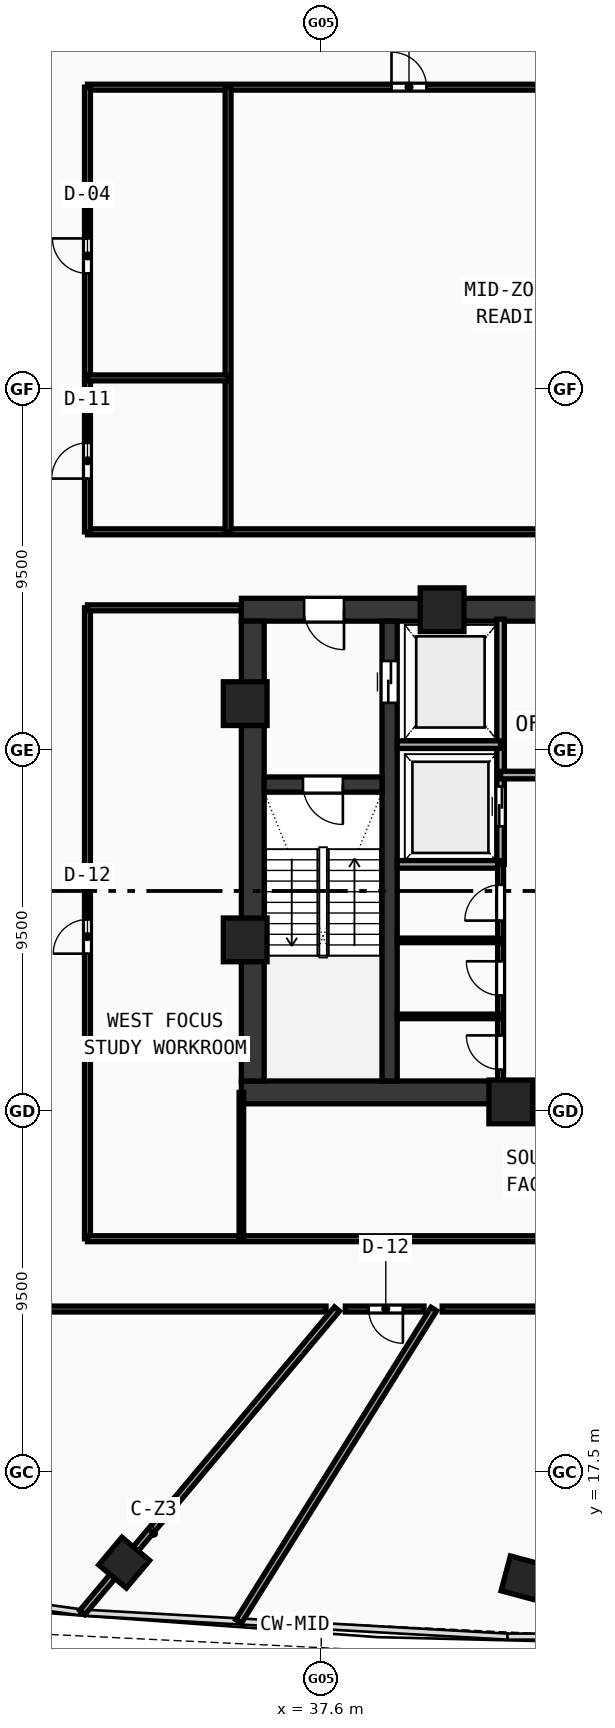
"""IFC4 building model, lengths in metres.
Left out: names, types, materials, properties, quantities, classifications, styles, units other than length and angle.
Written with IfcOpenShell. Run it as: python <this file> out.ifc"""

import sys

from ifc_helpers import new_model, si_unit, direction, frame, frame_2d, origin, origin_with_axes, origin_2d, place, context, subcontext, project, spatial, rectangle, hollow_rectangle, extrude, source, transform, mapped, element, fill, save


model = new_model("IFC4")
c1 = context("Model", 3, precision=1e-05, world=origin(), true_north=direction((0.0, 1.0)))
c2 = subcontext(c1, "Body", "Model", "MODEL_VIEW")
j1 = project(units=[si_unit("LENGTHUNIT", "METRE"), si_unit("PLANEANGLEUNIT", "RADIAN")], contexts=[c1])
p1 = place(None, origin())
s1 = spatial("IfcSite", under=j1, at=p1, CompositionType="ELEMENT")
p2 = place(p1, origin())
s2 = spatial("IfcBuilding", under=s1, at=p2, CompositionType="ELEMENT")
p3 = place(p2, frame((0.0, 0.0, 144.55)))
s3 = spatial("IfcBuildingStorey", under=s2, at=p3, CompositionType="ELEMENT", Elevation=144.55)
p4 = place(p3, frame((35.5, 27.5, 0.0), z_axis=(0.0, 0.0, 1.0), x_axis=(1.0, 0.0, 0.0)))
e1 = element("IfcWall", 1, at=p4, inside=s3, PredefinedType="SHEAR", context=c2, shape_type="SweptSolid", body=[
    extrude(rectangle(XDim=25.0, YDim=0.6, at=frame_2d((12.5, 0.0))), origin(), (0.0, 0.0, 1.0), 3.42),
])
p5 = place(p3, frame((35.5, 40.2, 0.0), z_axis=(0.0, 0.0, 1.0), x_axis=(1.0, 0.0, 0.0)))
e2 = element("IfcWall", 2, at=p5, inside=s3, PredefinedType="SHEAR", context=c2, shape_type="SweptSolid", body=[
    extrude(rectangle(XDim=11.3, YDim=0.6, at=frame_2d((5.65, 0.0))), origin(), (0.0, 0.0, 1.0), 3.42),
])
p6 = place(p5, frame((1.65, 0.0, 0.0)))
e3 = element("IfcOpeningElement", 3, at=p6, cuts=e2, PredefinedType="OPENING", context=c2, shape_type="SweptSolid", body=[
    extrude(rectangle(XDim=1.05, YDim=2.1, at=frame_2d((0.525, 1.05))), frame((0.0, 0.31, 0.0), z_axis=(0.0, -1.0, 0.0), x_axis=(1.0, 0.0, 0.0)), (0.0, 0.0, 1.0), 0.62),
])
p7 = place(p3, frame((35.8, 27.8, 0.0), z_axis=(0.0, 0.0, 1.0), x_axis=(0.0, 1.0, 0.0)))
e4 = element("IfcWall", 4, at=p7, inside=s3, PredefinedType="SHEAR", context=c2, shape_type="SweptSolid", body=[
    extrude(rectangle(XDim=12.1, YDim=0.6, at=frame_2d((6.05, 0.0))), origin(), (0.0, 0.0, 1.0), 3.42),
])
p8 = place(p3, frame((39.4, 27.8, 0.0), z_axis=(0.0, 0.0, 1.0), x_axis=(0.0, 1.0, 0.0)))
e5 = element("IfcWall", 5, at=p8, inside=s3, PredefinedType="SHEAR", context=c2, shape_type="SweptSolid", body=[
    extrude(rectangle(XDim=12.1, YDim=0.4, at=frame_2d((6.05, 0.0))), origin(), (0.0, 0.0, 1.0), 3.42),
])
p9 = place(p8, frame((9.95, 0.0, 0.0)))
e6 = element("IfcOpeningElement", 6, at=p9, cuts=e5, PredefinedType="OPENING", context=c2, shape_type="SweptSolid", body=[
    extrude(rectangle(XDim=1.1, YDim=2.1, at=frame_2d((0.55, 1.05))), frame((0.0, 0.21, 0.0), z_axis=(0.0, -1.0, 0.0), x_axis=(1.0, 0.0, 0.0)), (0.0, 0.0, 1.0), 0.42),
])
p10 = place(p3, frame((36.1, 35.6, 0.0), z_axis=(0.0, 0.0, 1.0), x_axis=(1.0, 0.0, 0.0)))
e7 = element("IfcWall", 7, at=p10, inside=s3, PredefinedType="SHEAR", context=c2, shape_type="SweptSolid", body=[
    extrude(rectangle(XDim=3.1, YDim=0.4, at=frame_2d((1.55, 0.0))), origin(), (0.0, 0.0, 1.0), 3.42),
])
p11 = place(p10, frame((1.02, 0.0, 0.0)))
e8 = element("IfcOpeningElement", 8, at=p11, cuts=e7, PredefinedType="OPENING", context=c2, shape_type="SweptSolid", body=[
    extrude(rectangle(XDim=1.05, YDim=2.1, at=frame_2d((0.525, 1.05))), frame((0.0, 0.21, 0.0), z_axis=(0.0, -1.0, 0.0), x_axis=(1.0, 0.0, 0.0)), (0.0, 0.0, 1.0), 0.42),
])
m1 = source(origin(), c2, "Body", "SweptSolid", [
    extrude(hollow_rectangle(XDim=1.15, YDim=1.15, WallThickness=0.048, at=origin_2d()), origin(), (0.0, 0.0, 1.0), 3.68),
])
for number, where, z_axis, x_axis in (
    (9, (42.588, 27.25, -0.26), (0.0, 0.0, 1.0), (1.0, 0.0, 0.0)),
    (10, (40.781, 40.2, -0.26), (0.0, 0.0, 1.0), (1.0, 0.0, 0.0)),
    (11, (35.6, 37.729, -0.26), (0.0, 0.0, 1.0), (1.0, 0.0, 0.0)),
    (12, (35.6, 31.513, -0.26), (0.0, 0.0, 1.0), (1.0, 0.0, 0.0)),
):
    element("IfcColumn", number, at=place(p3, frame(where, z_axis=z_axis, x_axis=x_axis)), inside=s3, PredefinedType="COLUMN", context=c2, shape_type="MappedRepresentation", body=[
        mapped(m1, transform((0.0, 0.0, 0.0), scale=1.0)),
    ])
m2 = source(origin(), c2, "Body", "SweptSolid", [
    extrude(hollow_rectangle(XDim=0.95, YDim=0.95, WallThickness=0.04, at=origin_2d()), origin(), (0.0, 0.0, 1.0), 3.68),
])
for number, where, z_axis, x_axis in (
    (13, (32.415, 15.126, -0.26), (0.0, 0.0, 1.0), (0.766, -0.643, 0.0)),
    (14, (42.915, 14.722, -0.26), (0.0, 0.0, 1.0), (0.966, -0.259, 0.0)),
):
    element("IfcColumn", number, at=place(p3, frame(where, z_axis=z_axis, x_axis=x_axis)), inside=s3, PredefinedType="COLUMN", context=c2, shape_type="MappedRepresentation", body=[
        mapped(m2, transform((0.0, 0.0, 0.0), scale=1.0)),
    ])
p12 = place(p3, frame((42.32, 33.5, 0.0), z_axis=(0.0, 0.0, 1.0), x_axis=(0.0, 1.0, 0.0)))
e15 = element("IfcWall", 15, at=p12, inside=s3, PredefinedType="SOLIDWALL", context=c2, shape_type="SweptSolid", body=[
    extrude(rectangle(XDim=6.45, YDim=0.2, at=frame_2d((3.225, 0.0))), origin(), (0.0, 0.0, 1.0), 3.42),
])
p13 = place(p12, frame((1.0, 0.0, 0.0)))
e16 = element("IfcOpeningElement", 16, at=p13, cuts=e15, PredefinedType="OPENING", context=c2, shape_type="SweptSolid", body=[
    extrude(rectangle(XDim=1.05, YDim=2.1, at=frame_2d((0.525, 1.05))), frame((0.0, 0.11, 0.0), z_axis=(0.0, -1.0, 0.0), x_axis=(1.0, 0.0, 0.0)), (0.0, 0.0, 1.0), 0.22),
])
for number, where, z_axis, x_axis in (
    (17, (39.6, 36.65, 0.0), (0.0, 0.0, 1.0), (1.0, 0.0, 0.0)),
    (18, (39.6, 33.5, 0.0), (0.0, 0.0, 1.0), (1.0, 0.0, 0.0)),
):
    element("IfcWall", number, at=place(p3, frame(where, z_axis=z_axis, x_axis=x_axis)), inside=s3, PredefinedType="SOLIDWALL", context=c2, shape_type="SweptSolid", body=[
        extrude(rectangle(XDim=2.72, YDim=0.2, at=frame_2d((1.36, 0.0))), origin(), (0.0, 0.0, 1.0), 3.42),
    ])
p14 = place(p3, frame((42.32, 35.85, 0.0), z_axis=(0.0, 0.0, 1.0), x_axis=(1.0, 0.0, 0.0)))
e19 = element("IfcWall", 19, at=p14, inside=s3, PredefinedType="SOLIDWALL", context=c2, shape_type="SweptSolid", body=[
    extrude(rectangle(XDim=4.73, YDim=0.2, at=frame_2d((2.365, 0.0))), origin(), (0.0, 0.0, 1.0), 3.42),
])
p15 = place(p14, frame((1.8, 0.0, 0.0)))
e20 = element("IfcOpeningElement", 20, at=p15, cuts=e19, PredefinedType="OPENING", context=c2, shape_type="SweptSolid", body=[
    extrude(rectangle(XDim=0.9, YDim=2.1, at=frame_2d((0.45, 1.05))), frame((0.0, 0.11, 0.0), z_axis=(0.0, -1.0, 0.0), x_axis=(1.0, 0.0, 0.0)), (0.0, 0.0, 1.0), 0.22),
])
p16 = place(p3, frame((42.32, 27.6, 0.0), z_axis=(0.0, 0.0, 1.0), x_axis=(0.0, 1.0, 0.0)))
e21 = element("IfcWall", 21, at=p16, inside=s3, PredefinedType="PARTITIONING", context=c2, shape_type="SweptSolid", body=[
    extrude(rectangle(XDim=5.9, YDim=0.155, at=frame_2d((2.95, 0.0))), origin(), (0.0, 0.0, 1.0), 3.42),
])
p17 = place(p16, frame((0.5, 0.0, 0.0)))
e22 = element("IfcOpeningElement", 22, at=p17, cuts=e21, PredefinedType="OPENING", context=c2, shape_type="SweptSolid", body=[
    extrude(rectangle(XDim=0.9, YDim=2.1, at=frame_2d((0.45, 1.05))), frame((0.0, 0.087, 0.0), z_axis=(0.0, -1.0, 0.0), x_axis=(1.0, 0.0, 0.0)), (0.0, 0.0, 1.0), 0.175),
])
p18 = place(p16, frame((2.45, 0.0, 0.0)))
e23 = element("IfcOpeningElement", 23, at=p18, cuts=e21, PredefinedType="OPENING", context=c2, shape_type="SweptSolid", body=[
    extrude(rectangle(XDim=0.9, YDim=2.1, at=frame_2d((0.45, 1.05))), frame((0.0, 0.087, 0.0), z_axis=(0.0, -1.0, 0.0), x_axis=(1.0, 0.0, 0.0)), (0.0, 0.0, 1.0), 0.175),
])
p19 = place(p16, frame((4.42, 0.0, 0.0)))
e24 = element("IfcOpeningElement", 24, at=p19, cuts=e21, PredefinedType="OPENING", context=c2, shape_type="SweptSolid", body=[
    extrude(rectangle(XDim=0.94, YDim=2.1, at=frame_2d((0.47, 1.05))), frame((0.0, 0.087, 0.0), z_axis=(0.0, -1.0, 0.0), x_axis=(1.0, 0.0, 0.0)), (0.0, 0.0, 1.0), 0.175),
])
for number, where, z_axis, x_axis in (
    (25, (39.6, 29.5, 0.0), (0.0, 0.0, 1.0), (1.0, 0.0, 0.0)),
    (26, (39.6, 31.5, 0.0), (0.0, 0.0, 1.0), (1.0, 0.0, 0.0)),
):
    element("IfcWall", number, at=place(p3, frame(where, z_axis=z_axis, x_axis=x_axis)), inside=s3, PredefinedType="PARTITIONING", context=c2, shape_type="SweptSolid", body=[
        extrude(rectangle(XDim=2.72, YDim=0.12, at=frame_2d((1.36, 0.0))), origin(), (0.0, 0.0, 1.0), 3.42),
    ])
p20 = place(p3, frame((31.45, 42.25, 0.0), z_axis=(0.0, 0.0, 1.0), x_axis=(1.0, 0.0, 0.0)))
e27 = element("IfcWall", 27, at=p20, inside=s3, PredefinedType="PARTITIONING", context=c2, shape_type="SweptSolid", body=[
    extrude(rectangle(XDim=33.1, YDim=0.155, at=frame_2d((16.55, 0.0))), origin(), (0.0, 0.0, 1.0), 2.77),
])
p21 = place(p3, frame((31.45, 53.95, 0.0), z_axis=(0.0, 0.0, 1.0), x_axis=(1.0, 0.0, 0.0)))
e28 = element("IfcWall", 28, at=p21, inside=s3, PredefinedType="PARTITIONING", context=c2, shape_type="SweptSolid", body=[
    extrude(rectangle(XDim=33.1, YDim=0.155, at=frame_2d((16.55, 0.0))), origin(), (0.0, 0.0, 1.0), 2.77),
])
p22 = place(p21, frame((8.0, 0.0, 0.0)))
e29 = element("IfcOpeningElement", 29, at=p22, cuts=e28, PredefinedType="OPENING", context=c2, shape_type="SweptSolid", body=[
    extrude(rectangle(XDim=0.92, YDim=2.1, at=frame_2d((0.46, 1.05))), frame((0.0, 0.087, 0.0), z_axis=(0.0, -1.0, 0.0), x_axis=(1.0, 0.0, 0.0)), (0.0, 0.0, 1.0), 0.175),
])
p23 = place(p21, frame((25.05, 0.0, 0.0)))
e30 = element("IfcOpeningElement", 30, at=p23, cuts=e28, PredefinedType="OPENING", context=c2, shape_type="SweptSolid", body=[
    extrude(rectangle(XDim=0.92, YDim=2.1, at=frame_2d((0.46, 1.05))), frame((0.0, 0.087, 0.0), z_axis=(0.0, -1.0, 0.0), x_axis=(1.0, 0.0, 0.0)), (0.0, 0.0, 1.0), 0.175),
])
p24 = place(p3, frame((31.45, 42.25, 0.0), z_axis=(0.0, 0.0, 1.0), x_axis=(0.0, 1.0, 0.0)))
e31 = element("IfcWall", 31, at=p24, inside=s3, PredefinedType="PARTITIONING", context=c2, shape_type="SweptSolid", body=[
    extrude(rectangle(XDim=11.7, YDim=0.155, at=frame_2d((5.85, 0.0))), origin(), (0.0, 0.0, 1.0), 2.77),
])
p25 = place(p24, frame((1.4, 0.0, 0.0)))
e32 = element("IfcOpeningElement", 32, at=p25, cuts=e31, PredefinedType="OPENING", context=c2, shape_type="SweptSolid", body=[
    extrude(rectangle(XDim=0.94, YDim=2.1, at=frame_2d((0.47, 1.05))), frame((0.0, 0.087, 0.0), z_axis=(0.0, -1.0, 0.0), x_axis=(1.0, 0.0, 0.0)), (0.0, 0.0, 1.0), 0.175),
])
p26 = place(p24, frame((6.8, 0.0, 0.0)))
e33 = element("IfcOpeningElement", 33, at=p26, cuts=e31, PredefinedType="OPENING", context=c2, shape_type="SweptSolid", body=[
    extrude(rectangle(XDim=0.92, YDim=2.1, at=frame_2d((0.46, 1.05))), frame((0.0, 0.087, 0.0), z_axis=(0.0, -1.0, 0.0), x_axis=(1.0, 0.0, 0.0)), (0.0, 0.0, 1.0), 0.175),
])
p27 = place(p3, frame((35.15, 42.25, 0.0), z_axis=(0.0, 0.0, 1.0), x_axis=(0.0, 1.0, 0.0)))
e34 = element("IfcWall", 34, at=p27, inside=s3, PredefinedType="PARTITIONING", context=c2, shape_type="SweptSolid", body=[
    extrude(rectangle(XDim=11.7, YDim=0.155, at=frame_2d((5.85, 0.0))), origin(), (0.0, 0.0, 1.0), 2.77),
])
p28 = place(p3, frame((31.45, 46.3, 0.0), z_axis=(0.0, 0.0, 1.0), x_axis=(1.0, 0.0, 0.0)))
e35 = element("IfcWall", 35, at=p28, inside=s3, PredefinedType="PARTITIONING", context=c2, shape_type="SweptSolid", body=[
    extrude(rectangle(XDim=3.7, YDim=0.155, at=frame_2d((1.85, 0.0))), origin(), (0.0, 0.0, 1.0), 2.77),
])
p29 = place(p3, frame((31.45, 23.65, 0.0), z_axis=(0.0, 0.0, 1.0), x_axis=(0.0, 1.0, 0.0)))
e36 = element("IfcWall", 36, at=p29, inside=s3, PredefinedType="PARTITIONING", context=c2, shape_type="SweptSolid", body=[
    extrude(rectangle(XDim=16.6, YDim=0.155, at=frame_2d((8.3, 0.0))), origin(), (0.0, 0.0, 1.0), 2.77),
])
p30 = place(p29, frame((7.5, 0.0, 0.0)))
e37 = element("IfcOpeningElement", 37, at=p30, cuts=e36, PredefinedType="OPENING", context=c2, shape_type="SweptSolid", body=[
    extrude(rectangle(XDim=0.9, YDim=2.08, at=frame_2d((0.45, 1.04))), frame((0.0, 0.087, 0.0), z_axis=(0.0, -1.0, 0.0), x_axis=(1.0, 0.0, 0.0)), (0.0, 0.0, 1.0), 0.175),
])
p31 = place(p3, frame((31.45, 23.65, 0.0), z_axis=(0.0, 0.0, 1.0), x_axis=(1.0, 0.0, 0.0)))
e38 = element("IfcWall", 38, at=p31, inside=s3, PredefinedType="PARTITIONING", context=c2, shape_type="SweptSolid", body=[
    extrude(rectangle(XDim=33.1, YDim=0.155, at=frame_2d((16.55, 0.0))), origin(), (0.0, 0.0, 1.0), 2.77),
])
p32 = place(p31, frame((16.0, 0.0, 0.0)))
e39 = element("IfcOpeningElement", 39, at=p32, cuts=e38, PredefinedType="OPENING", context=c2, shape_type="SweptSolid", body=[
    extrude(rectangle(XDim=0.92, YDim=2.1, at=frame_2d((0.46, 1.05))), frame((0.0, 0.087, 0.0), z_axis=(0.0, -1.0, 0.0), x_axis=(1.0, 0.0, 0.0)), (0.0, 0.0, 1.0), 0.175),
])
p33 = place(p3, frame((31.45, 40.25, 0.0), z_axis=(0.0, 0.0, 1.0), x_axis=(1.0, 0.0, 0.0)))
e40 = element("IfcWall", 40, at=p33, inside=s3, PredefinedType="PARTITIONING", context=c2, shape_type="SweptSolid", body=[
    extrude(rectangle(XDim=4.05, YDim=0.155, at=frame_2d((2.025, 0.0))), origin(), (0.0, 0.0, 1.0), 3.42),
])
p34 = place(p3, frame((35.5, 23.65, 0.0), z_axis=(0.0, 0.0, 1.0), x_axis=(0.0, 1.0, 0.0)))
e41 = element("IfcWall", 41, at=p34, inside=s3, PredefinedType="PARTITIONING", context=c2, shape_type="SweptSolid", body=[
    extrude(rectangle(XDim=3.85, YDim=0.12, at=frame_2d((1.925, 0.0))), origin(), (0.0, 0.0, 1.0), 3.02),
])
p35 = place(p3, frame((38.015, 21.8, 0.0), z_axis=(0.0, 0.0, 1.0), x_axis=(-0.642781677101, -0.76604942111, 0.0)))
e42 = element("IfcWall", 42, at=p35, inside=s3, PredefinedType="PARTITIONING", context=c2, shape_type="SweptSolid", body=[
    extrude(rectangle(XDim=10.424, YDim=0.175, at=frame_2d((5.212, 0.0))), origin(), (0.0, 0.0, 1.0), 2.77),
])
p36 = place(p3, frame((40.564, 21.8, 0.0), z_axis=(0.0, 0.0, 1.0), x_axis=(-0.529931002604, -0.848040761096, 0.0)))
e43 = element("IfcWall", 43, at=p36, inside=s3, PredefinedType="PARTITIONING", context=c2, shape_type="SweptSolid", body=[
    extrude(rectangle(XDim=9.691, YDim=0.175, at=frame_2d((4.845, 0.0))), origin(), (0.0, 0.0, 1.0), 2.77),
])
p37 = place(p3, frame((50.969, 21.8, 0.0), z_axis=(0.0, 0.0, 1.0), x_axis=(-1.0, 0.0, 0.0)))
e44 = element("IfcWall", 44, at=p37, inside=s3, PredefinedType="PARTITIONING", context=c2, shape_type="SweptSolid", body=[
    extrude(rectangle(XDim=10.185, YDim=0.155, at=frame_2d((5.092, 0.0))), origin(), (0.0, 0.0, 1.0), 2.77),
])
p38 = place(p37, frame((4.617, 0.0, 0.0)))
e45 = element("IfcOpeningElement", 45, at=p38, cuts=e44, PredefinedType="OPENING", context=c2, shape_type="SweptSolid", body=[
    extrude(rectangle(XDim=0.96, YDim=2.12, at=frame_2d((0.48, 1.06))), frame((0.0, 0.087, 0.0), z_axis=(0.0, -1.0, 0.0), x_axis=(1.0, 0.0, 0.0)), (0.0, 0.0, 1.0), 0.175),
])
p39 = place(p3, frame((40.305, 21.8, 0.0), z_axis=(0.0, 0.0, 1.0), x_axis=(-1.0, 0.0, 0.0)))
e46 = element("IfcWall", 46, at=p39, inside=s3, PredefinedType="PARTITIONING", context=c2, shape_type="SweptSolid", body=[
    extrude(rectangle(XDim=2.07, YDim=0.155, at=frame_2d((1.035, 0.0))), origin(), (0.0, 0.0, 1.0), 2.77),
])
p40 = place(p39, frame((0.555, 0.0, 0.0)))
e47 = element("IfcOpeningElement", 47, at=p40, cuts=e46, PredefinedType="OPENING", context=c2, shape_type="SweptSolid", body=[
    extrude(rectangle(XDim=0.9, YDim=2.08, at=frame_2d((0.45, 1.04))), frame((0.0, 0.087, 0.0), z_axis=(0.0, -1.0, 0.0), x_axis=(1.0, 0.0, 0.0)), (0.0, 0.0, 1.0), 0.175),
])
p41 = place(p3, frame((37.728, 21.8, 0.0), z_axis=(0.0, 0.0, 1.0), x_axis=(-1.0, 0.0, 0.0)))
e48 = element("IfcWall", 48, at=p41, inside=s3, PredefinedType="PARTITIONING", context=c2, shape_type="SweptSolid", body=[
    extrude(rectangle(XDim=8.127, YDim=0.155, at=frame_2d((4.064, 0.0))), origin(), (0.0, 0.0, 1.0), 3.02),
])
m3 = source(origin(), c2, "Body", "SweptSolid", [
    extrude(rectangle(XDim=1.05, YDim=2.1, at=frame_2d((0.525, 1.05))), frame((0.0, 0.025, 0.0), z_axis=(0.0, -1.0, 0.0), x_axis=(1.0, 0.0, 0.0)), (0.0, 0.0, 1.0), 0.05),
])
p42 = place(p11, frame((1.05, 0.0, 0.0), z_axis=(0.0, 0.0, 1.0), x_axis=(-1.0, 0.0, 0.0)))
e49 = element("IfcDoor", 49, at=p42, inside=s3, OperationType="SINGLE_SWING_LEFT", PredefinedType="DOOR", context=c2, shape_type="MappedRepresentation", body=[
    mapped(m3, transform((0.0, 0.0, 0.0), scale=1.0)),
])
fill(e8, e49)
p43 = place(p6, frame((1.05, 0.0, 0.0), z_axis=(0.0, 0.0, 1.0), x_axis=(-1.0, 0.0, 0.0)))
e50 = element("IfcDoor", 50, at=p43, inside=s3, OperationType="SINGLE_SWING_LEFT", PredefinedType="DOOR", context=c2, shape_type="MappedRepresentation", body=[
    mapped(m3, transform((0.0, 0.0, 0.0), scale=1.0)),
])
fill(e3, e50)
m4 = source(origin(), c2, "Body", "SweptSolid", [
    extrude(rectangle(XDim=1.1, YDim=2.1, at=frame_2d((0.55, 1.05))), frame((0.0, 0.025, 0.0), z_axis=(0.0, -1.0, 0.0), x_axis=(1.0, 0.0, 0.0)), (0.0, 0.0, 1.0), 0.05),
])
p44 = place(p9, frame((1.1, 0.0, 0.0), z_axis=(0.0, 0.0, 1.0), x_axis=(-1.0, 0.0, 0.0)))
e51 = element("IfcDoor", 51, at=p44, inside=s3, OperationType="DOUBLE_DOOR_SLIDING", PredefinedType="DOOR", context=c2, shape_type="MappedRepresentation", body=[
    mapped(m4, transform((0.0, 0.0, 0.0), scale=1.0)),
])
fill(e6, e51)
p45 = place(p13, origin_with_axes())
e52 = element("IfcDoor", 52, at=p45, inside=s3, OperationType="DOUBLE_DOOR_SLIDING", PredefinedType="DOOR", context=c2, shape_type="MappedRepresentation", body=[
    mapped(m3, transform((0.0, 0.0, 0.0), scale=1.0)),
])
fill(e16, e52)
m5 = source(origin(), c2, "Body", "SweptSolid", [
    extrude(rectangle(XDim=0.9, YDim=2.1, at=frame_2d((0.45, 1.05))), frame((0.0, 0.025, 0.0), z_axis=(0.0, -1.0, 0.0), x_axis=(1.0, 0.0, 0.0)), (0.0, 0.0, 1.0), 0.05),
])
p46 = place(p17, origin_with_axes())
e53 = element("IfcDoor", 53, at=p46, inside=s3, OperationType="SINGLE_SWING_RIGHT", PredefinedType="DOOR", context=c2, shape_type="MappedRepresentation", body=[
    mapped(m5, transform((0.0, 0.0, 0.0), scale=1.0)),
])
fill(e22, e53)
p47 = place(p18, origin_with_axes())
e54 = element("IfcDoor", 54, at=p47, inside=s3, OperationType="SINGLE_SWING_RIGHT", PredefinedType="DOOR", context=c2, shape_type="MappedRepresentation", body=[
    mapped(m5, transform((0.0, 0.0, 0.0), scale=1.0)),
])
fill(e23, e54)
m6 = source(origin(), c2, "Body", "SweptSolid", [
    extrude(rectangle(XDim=0.94, YDim=2.1, at=frame_2d((0.47, 1.05))), frame((0.0, 0.025, 0.0), z_axis=(0.0, -1.0, 0.0), x_axis=(1.0, 0.0, 0.0)), (0.0, 0.0, 1.0), 0.05),
])
p48 = place(p19, origin_with_axes())
e55 = element("IfcDoor", 55, at=p48, inside=s3, OperationType="SINGLE_SWING_LEFT", PredefinedType="DOOR", context=c2, shape_type="MappedRepresentation", body=[
    mapped(m6, transform((0.0, 0.0, 0.0), scale=1.0)),
])
fill(e24, e55)
p49 = place(p25, origin_with_axes())
e56 = element("IfcDoor", 56, at=p49, inside=s3, OperationType="SINGLE_SWING_LEFT", PredefinedType="DOOR", context=c2, shape_type="MappedRepresentation", body=[
    mapped(m6, transform((0.0, 0.0, 0.0), scale=1.0)),
])
fill(e32, e56)
m7 = source(origin(), c2, "Body", "SweptSolid", [
    extrude(rectangle(XDim=0.92, YDim=2.1, at=frame_2d((0.46, 1.05))), frame((0.0, 0.025, 0.0), z_axis=(0.0, -1.0, 0.0), x_axis=(1.0, 0.0, 0.0)), (0.0, 0.0, 1.0), 0.05),
])
p50 = place(p26, origin_with_axes())
e57 = element("IfcDoor", 57, at=p50, inside=s3, OperationType="SINGLE_SWING_RIGHT", PredefinedType="DOOR", context=c2, shape_type="MappedRepresentation", body=[
    mapped(m7, transform((0.0, 0.0, 0.0), scale=1.0)),
])
fill(e33, e57)
p51 = place(p22, origin_with_axes())
e58 = element("IfcDoor", 58, at=p51, inside=s3, OperationType="SINGLE_SWING_LEFT", PredefinedType="DOOR", context=c2, shape_type="MappedRepresentation", body=[
    mapped(m7, transform((0.0, 0.0, 0.0), scale=1.0)),
])
fill(e29, e58)
m8 = source(origin(), c2, "Body", "SweptSolid", [
    extrude(rectangle(XDim=0.9, YDim=2.08, at=frame_2d((0.45, 1.04))), frame((0.0, 0.025, 0.0), z_axis=(0.0, -1.0, 0.0), x_axis=(1.0, 0.0, 0.0)), (0.0, 0.0, 1.0), 0.05),
])
p52 = place(p30, origin_with_axes())
e59 = element("IfcDoor", 59, at=p52, inside=s3, OperationType="SINGLE_SWING_LEFT", PredefinedType="DOOR", context=c2, shape_type="MappedRepresentation", body=[
    mapped(m8, transform((0.0, 0.0, 0.0), scale=1.0)),
])
fill(e37, e59)
p53 = place(p40, origin_with_axes())
e60 = element("IfcDoor", 60, at=p53, inside=s3, OperationType="SINGLE_SWING_LEFT", PredefinedType="DOOR", context=c2, shape_type="MappedRepresentation", body=[
    mapped(m8, transform((0.0, 0.0, 0.0), scale=1.0)),
])
fill(e47, e60)
save(model, sys.argv[1])
